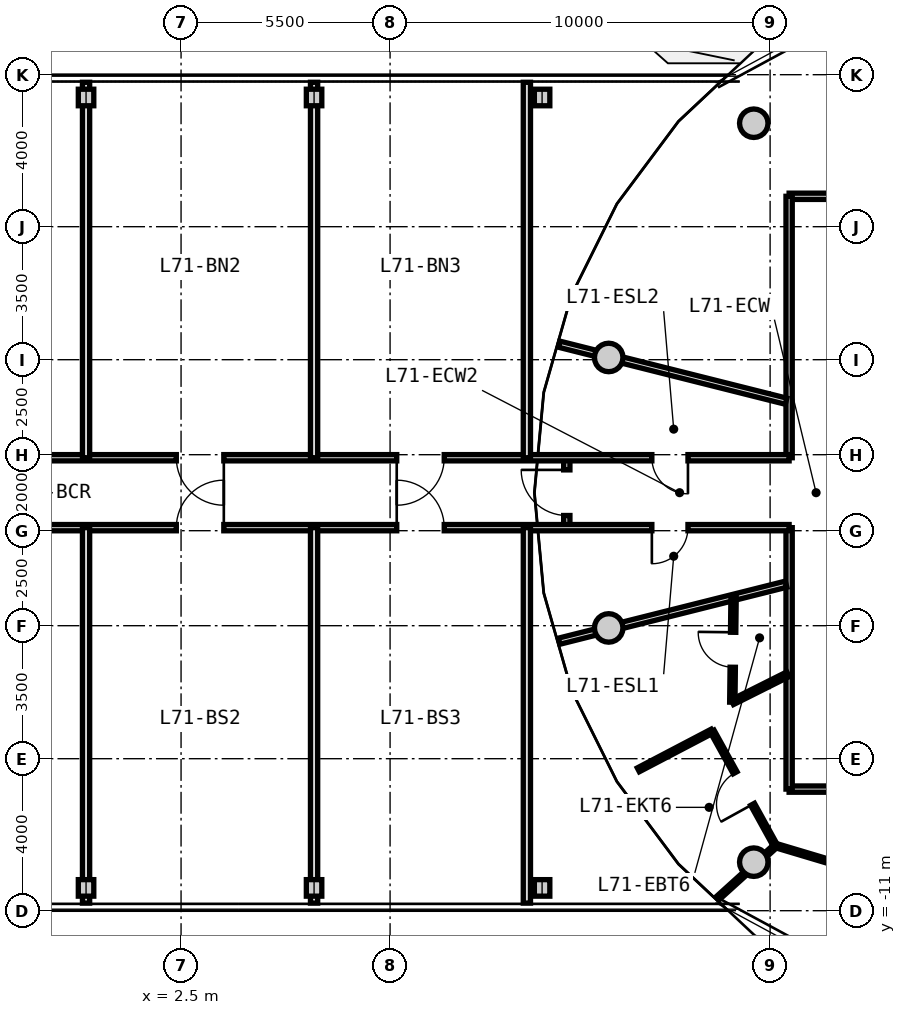
"""IFC4 building model, lengths in metres.
Left out: names, types, materials, properties, quantities, classifications, styles, units other than length and angle.
Written with IfcOpenShell. Run it as: python <this file> out.ifc"""

import sys

from ifc_helpers import new_model, si_unit, direction, frame, frame_2d, origin, origin_2d, place, context, subcontext, project, spatial, rectangle, circle, i_section, extrude, source, transform, mapped, element, fill, save


model = new_model("IFC4")
c1 = context("Model", 3, precision=1e-05, world=origin(), true_north=direction((0.0, 1.0)))
c2 = subcontext(c1, "Body", "Model", "MODEL_VIEW")
j1 = project(units=[si_unit("LENGTHUNIT", "METRE"), si_unit("PLANEANGLEUNIT", "RADIAN")], contexts=[c1])
p1 = place(None, origin())
s1 = spatial("IfcSite", under=j1, at=p1, CompositionType="ELEMENT")
p2 = place(p1, origin())
s2 = spatial("IfcBuilding", under=s1, at=p2, CompositionType="ELEMENT")
p3 = place(p2, frame((0.0, 0.0, 229.15)))
s3 = spatial("IfcBuildingStorey", under=s2, at=p3, CompositionType="ELEMENT", Elevation=229.15)
m1 = source(origin(), c2, "Body", "SweptSolid", [
    extrude(circle(Radius=0.375, at=origin_2d()), origin(), (0.0, 0.0, 1.0), 3.05),
])
for number, where, z_axis, x_axis in (
    (1, (17.57, 9.723, 0.0), (0.0, 0.0, 1.0), (1.0, 0.0, 0.0)),
    (2, (13.753, 3.559, 0.0), (0.0, 0.0, 1.0), (1.0, 0.0, 0.0)),
    (3, (13.753, -3.559, 0.0), (0.0, 0.0, 1.0), (1.0, 0.0, 0.0)),
    (4, (17.57, -9.723, 0.0), (0.0, 0.0, 1.0), (1.0, 0.0, 0.0)),
):
    element("IfcColumn", number, at=place(p3, frame(where, z_axis=z_axis, x_axis=x_axis)), inside=s3, PredefinedType="COLUMN", context=c2, shape_type="MappedRepresentation", body=[
        mapped(m1, transform((0.0, 0.0, 0.0), x_axis=(1.0, 0.0, 0.0), y_axis=(0.0, 1.0, 0.0), z_axis=(0.0, 0.0, 1.0), scale=1.0)),
    ])
m2 = source(origin(), c2, "Body", "SweptSolid", [
    extrude(i_section(OverallWidth=0.407, OverallDepth=0.435, WebThickness=0.024, FlangeThickness=0.039, FilletRadius=0.015, at=origin_2d()), origin(), (0.0, 0.0, 1.0), 3.05),
])
for number, where, z_axis, x_axis in (
    (5, (0.0, -10.4, 0.0), (0.0, 0.0, 1.0), (1.0, 0.0, 0.0)),
    (6, (0.0, 10.4, 0.0), (0.0, 0.0, 1.0), (1.0, 0.0, 0.0)),
    (7, (6.0, -10.4, 0.0), (0.0, 0.0, 1.0), (1.0, 0.0, 0.0)),
    (8, (6.0, 10.4, 0.0), (0.0, 0.0, 1.0), (1.0, 0.0, 0.0)),
    (9, (12.0, -10.4, 0.0), (0.0, 0.0, 1.0), (1.0, 0.0, 0.0)),
    (10, (12.0, 10.4, 0.0), (0.0, 0.0, 1.0), (1.0, 0.0, 0.0)),
):
    element("IfcColumn", number, at=place(p3, frame(where, z_axis=z_axis, x_axis=x_axis)), inside=s3, PredefinedType="COLUMN", context=c2, shape_type="MappedRepresentation", body=[
        mapped(m2, transform((0.0, 0.0, 0.0), x_axis=(1.0, 0.0, 0.0), y_axis=(0.0, 1.0, 0.0), z_axis=(0.0, 0.0, 1.0), scale=1.0)),
    ])
m3 = source(origin(), c2, "Body", "SweptSolid", [
    extrude(rectangle(XDim=8.58, YDim=0.165, at=frame_2d((4.29, 0.0))), origin(), (0.0, 0.0, 1.0), 2.795),
])
p4 = place(p3, frame((18.5, 7.8, 0.0), z_axis=(0.0, 0.0, 1.0), x_axis=(1.0, 0.0, 0.0)))
e11 = element("IfcWall", 11, at=p4, inside=s3, PredefinedType="PARTITIONING", context=c2, shape_type="MappedRepresentation", body=[
    mapped(m3, transform((0.0, 0.0, 0.0), x_axis=(1.0, 0.0, 0.0), y_axis=(0.0, 1.0, 0.0), z_axis=(0.0, 0.0, 1.0), scale=1.0)),
])
p5 = place(p4, frame((3.11, 0.0, 0.0)))
e12 = element("IfcOpeningElement", 12, at=p5, cuts=e11, PredefinedType="OPENING", context=c2, shape_type="SweptSolid", body=[
    extrude(rectangle(XDim=1.25, YDim=2.2, at=frame_2d((0.625, 1.1))), frame((0.0, 0.093, 0.0), z_axis=(0.0, -1.0, 0.0), x_axis=(1.0, 0.0, 0.0)), (0.0, 0.0, 1.0), 0.185),
])
m4 = source(origin(), c2, "Body", "SweptSolid", [
    extrude(rectangle(XDim=19.0, YDim=0.165, at=frame_2d((9.5, 0.0))), origin(), (0.0, 0.0, 1.0), 2.795),
])
p6 = place(p3, frame((37.5, -7.8, 0.0), z_axis=(0.0, 0.0, 1.0), x_axis=(-1.0, 0.0, 0.0)))
e13 = element("IfcWall", 13, at=p6, inside=s3, PredefinedType="PARTITIONING", context=c2, shape_type="MappedRepresentation", body=[
    mapped(m4, transform((0.0, 0.0, 0.0), x_axis=(1.0, 0.0, 0.0), y_axis=(0.0, 1.0, 0.0), z_axis=(0.0, 0.0, 1.0), scale=1.0)),
])
p7 = place(p6, frame((9.392, 0.0, 0.0)))
e14 = element("IfcOpeningElement", 14, at=p7, cuts=e13, PredefinedType="OPENING", context=c2, shape_type="SweptSolid", body=[
    extrude(rectangle(XDim=1.05, YDim=2.15, at=frame_2d((0.525, 1.075))), frame((0.0, 0.093, 0.0), z_axis=(0.0, -1.0, 0.0), x_axis=(1.0, 0.0, 0.0)), (0.0, 0.0, 1.0), 0.185),
])
m5 = source(origin(), c2, "Body", "SweptSolid", [
    extrude(rectangle(XDim=6.88, YDim=0.165, at=frame_2d((3.44, 0.0))), origin(), (0.0, 0.0, 1.0), 2.795),
])
for number, where, z_axis, x_axis in (
    (15, (18.5, -7.8, 0.0), (0.0, 0.0, 1.0), (0.0, 1.0, 0.0)),
    (16, (18.5, 0.92, 0.0), (0.0, 0.0, 1.0), (0.0, 1.0, 0.0)),
):
    element("IfcWall", number, at=place(p3, frame(where, z_axis=z_axis, x_axis=x_axis)), inside=s3, PredefinedType="PARTITIONING", context=c2, shape_type="MappedRepresentation", body=[
        mapped(m5, transform((0.0, 0.0, 0.0), x_axis=(1.0, 0.0, 0.0), y_axis=(0.0, 1.0, 0.0), z_axis=(0.0, 0.0, 1.0), scale=1.0)),
    ])
m6 = source(origin(), c2, "Body", "SweptSolid", [
    extrude(rectangle(XDim=6.157, YDim=0.165, at=frame_2d((3.079, 0.0))), origin(), (0.0, 0.0, 1.0), 2.395),
])
for number, where, z_axis, x_axis in (
    (17, (18.42, 2.407, 0.0), (0.0, 0.0, 1.0), (-0.97, 0.244, 0.0)),
    (18, (18.42, -2.407, 0.0), (0.0, 0.0, 1.0), (-0.97, -0.244, 0.0)),
):
    element("IfcWall", number, at=place(p3, frame(where, z_axis=z_axis, x_axis=x_axis)), inside=s3, PredefinedType="PARTITIONING", context=c2, shape_type="MappedRepresentation", body=[
        mapped(m6, transform((0.0, 0.0, 0.0), x_axis=(1.0, 0.0, 0.0), y_axis=(0.0, 1.0, 0.0), z_axis=(0.0, 0.0, 1.0), scale=1.0)),
    ])
m7 = source(origin(), c2, "Body", "SweptSolid", [
    extrude(rectangle(XDim=6.936, YDim=0.115, at=frame_2d((3.468, 0.0))), origin(), (0.0, 0.0, 1.0), 2.795),
])
p8 = place(p3, frame((18.151, -9.287, 0.0), z_axis=(0.0, 0.0, 1.0), x_axis=(0.958186895835, -0.286143098205, 0.0)))
e19 = element("IfcWall", 19, at=p8, inside=s3, PredefinedType="PARTITIONING", context=c2, shape_type="MappedRepresentation", body=[
    mapped(m7, transform((0.0, 0.0, 0.0), x_axis=(1.0, 0.0, 0.0), y_axis=(0.0, 1.0, 0.0), z_axis=(0.0, 0.0, 1.0), scale=1.0)),
])
p9 = place(p8, frame((2.993, 0.0, 0.0)))
e20 = element("IfcOpeningElement", 20, at=p9, cuts=e19, PredefinedType="OPENING", context=c2, shape_type="SweptSolid", body=[
    extrude(rectangle(XDim=0.95, YDim=2.1, at=frame_2d((0.475, 1.05))), frame((0.0, 0.067, 0.0), z_axis=(0.0, -1.0, 0.0), x_axis=(1.0, 0.0, 0.0)), (0.0, 0.0, 1.0), 0.135),
])
m8 = source(origin(), c2, "Body", "SweptSolid", [
    extrude(rectangle(XDim=2.072, YDim=0.115, at=frame_2d((1.036, 0.0))), origin(), (0.0, 0.0, 1.0), 2.395),
])
p10 = place(p3, frame((18.151, -9.287, 0.0), z_axis=(0.0, 0.0, 1.0), x_axis=(-0.741410125356, -0.671052178314, 0.0)))
e21 = element("IfcWall", 21, at=p10, inside=s3, PredefinedType="PARTITIONING", context=c2, shape_type="MappedRepresentation", body=[
    mapped(m8, transform((0.0, 0.0, 0.0), x_axis=(1.0, 0.0, 0.0), y_axis=(0.0, 1.0, 0.0), z_axis=(0.0, 0.0, 1.0), scale=1.0)),
])
m9 = source(origin(), c2, "Body", "SweptSolid", [
    extrude(rectangle(XDim=1.638, YDim=0.14, at=frame_2d((0.819, 0.0))), origin(), (0.0, 0.0, 1.0), 2.795),
])
p11 = place(p3, frame((18.47, -4.778, 0.0), z_axis=(0.0, 0.0, 1.0), x_axis=(-0.893919977945, -0.448226586707, 0.0)))
e22 = element("IfcWall", 22, at=p11, inside=s3, PredefinedType="PARTITIONING", context=c2, shape_type="MappedRepresentation", body=[
    mapped(m9, transform((0.0, 0.0, 0.0), x_axis=(1.0, 0.0, 0.0), y_axis=(0.0, 1.0, 0.0), z_axis=(0.0, 0.0, 1.0), scale=1.0)),
])
m10 = source(origin(), c2, "Body", "SweptSolid", [
    extrude(rectangle(XDim=2.759, YDim=0.14, at=frame_2d((1.379, 0.0))), origin(), (0.0, 0.0, 1.0), 2.795),
])
p12 = place(p3, frame((17.005, -5.513, 0.0), z_axis=(0.0, 0.0, 1.0), x_axis=(0.01194710728, 0.999928630767, 0.0)))
e23 = element("IfcWall", 23, at=p12, inside=s3, PredefinedType="PARTITIONING", context=c2, shape_type="MappedRepresentation", body=[
    mapped(m10, transform((0.0, 0.0, 0.0), x_axis=(1.0, 0.0, 0.0), y_axis=(0.0, 1.0, 0.0), z_axis=(0.0, 0.0, 1.0), scale=1.0)),
])
p13 = place(p12, frame((0.919, 0.0, 0.0)))
e24 = element("IfcOpeningElement", 24, at=p13, cuts=e23, PredefinedType="OPENING", context=c2, shape_type="SweptSolid", body=[
    extrude(rectangle(XDim=0.92, YDim=2.1, at=frame_2d((0.46, 1.05))), frame((0.0, 0.08, 0.0), z_axis=(0.0, -1.0, 0.0), x_axis=(1.0, 0.0, 0.0)), (0.0, 0.0, 1.0), 0.16),
])
m11 = source(origin(), c2, "Body", "SweptSolid", [
    extrude(rectangle(XDim=2.193, YDim=0.115, at=frame_2d((1.097, 0.0))), origin(), (0.0, 0.0, 1.0), 2.795),
])
p14 = place(p3, frame((16.475, -6.275, 0.0), z_axis=(0.0, 0.0, 1.0), x_axis=(-0.885783595046, -0.464098505435, 0.0)))
e25 = element("IfcWall", 25, at=p14, inside=s3, PredefinedType="PARTITIONING", context=c2, shape_type="MappedRepresentation", body=[
    mapped(m11, transform((0.0, 0.0, 0.0), x_axis=(1.0, 0.0, 0.0), y_axis=(0.0, 1.0, 0.0), z_axis=(0.0, 0.0, 1.0), scale=1.0)),
])
m12 = source(origin(), c2, "Body", "SweptSolid", [
    extrude(rectangle(XDim=3.45, YDim=0.115, at=frame_2d((1.725, 0.0))), origin(), (0.0, 0.0, 1.0), 2.795),
])
p15 = place(p3, frame((16.475, -6.275, 0.0), z_axis=(0.0, 0.0, 1.0), x_axis=(0.483659007882, -0.875256513312, 0.0)))
e26 = element("IfcWall", 26, at=p15, inside=s3, PredefinedType="PARTITIONING", context=c2, shape_type="MappedRepresentation", body=[
    mapped(m12, transform((0.0, 0.0, 0.0), x_axis=(1.0, 0.0, 0.0), y_axis=(0.0, 1.0, 0.0), z_axis=(0.0, 0.0, 1.0), scale=1.0)),
])
p16 = place(p15, frame((1.25, 0.0, 0.0)))
e27 = element("IfcOpeningElement", 27, at=p16, cuts=e26, PredefinedType="OPENING", context=c2, shape_type="SweptSolid", body=[
    extrude(rectangle(XDim=0.95, YDim=2.1, at=frame_2d((0.475, 1.05))), frame((0.0, 0.067, 0.0), z_axis=(0.0, -1.0, 0.0), x_axis=(1.0, 0.0, 0.0)), (0.0, 0.0, 1.0), 0.135),
])
m13 = source(origin(), c2, "Body", "SweptSolid", [
    extrude(rectangle(XDim=1.84, YDim=0.165, at=frame_2d((0.92, 0.0))), origin(), (0.0, 0.0, 1.0), 2.795),
])
p17 = place(p3, frame((12.65, -0.92, 0.0), z_axis=(0.0, 0.0, 1.0), x_axis=(0.0, 1.0, 0.0)))
e28 = element("IfcWall", 28, at=p17, inside=s3, PredefinedType="PARTITIONING", context=c2, shape_type="MappedRepresentation", body=[
    mapped(m13, transform((0.0, 0.0, 0.0), x_axis=(1.0, 0.0, 0.0), y_axis=(0.0, 1.0, 0.0), z_axis=(0.0, 0.0, 1.0), scale=1.0)),
])
p18 = place(p17, frame((0.32, 0.0, 0.0)))
e29 = element("IfcOpeningElement", 29, at=p18, cuts=e28, PredefinedType="OPENING", context=c2, shape_type="SweptSolid", body=[
    extrude(rectangle(XDim=1.2, YDim=2.15, at=frame_2d((0.6, 1.075))), frame((0.0, 0.093, 0.0), z_axis=(0.0, -1.0, 0.0), x_axis=(1.0, 0.0, 0.0)), (0.0, 0.0, 1.0), 0.185),
])
m14 = source(origin(), c2, "Body", "SweptSolid", [
    extrude(rectangle(XDim=37.0, YDim=0.165, at=frame_2d((18.5, 0.0))), origin(), (0.0, 0.0, 1.0), 2.795),
])
p19 = place(p3, frame((-18.5, -0.92, 0.0), z_axis=(0.0, 0.0, 1.0), x_axis=(1.0, 0.0, 0.0)))
e30 = element("IfcWall", 30, at=p19, inside=s3, PredefinedType="PARTITIONING", context=c2, shape_type="MappedRepresentation", body=[
    mapped(m14, transform((0.0, 0.0, 0.0), x_axis=(1.0, 0.0, 0.0), y_axis=(0.0, 1.0, 0.0), z_axis=(0.0, 0.0, 1.0), scale=1.0)),
])
p20 = place(p19, frame((2.662, 0.0, 0.0)))
e31 = element("IfcOpeningElement", 31, at=p20, cuts=e30, PredefinedType="OPENING", context=c2, shape_type="SweptSolid", body=[
    extrude(rectangle(XDim=0.95, YDim=2.1, at=frame_2d((0.475, 1.05))), frame((0.0, 0.093, 0.0), z_axis=(0.0, -1.0, 0.0), x_axis=(1.0, 0.0, 0.0)), (0.0, 0.0, 1.0), 0.185),
])
p21 = place(p19, frame((33.388, 0.0, 0.0)))
e32 = element("IfcOpeningElement", 32, at=p21, cuts=e30, PredefinedType="OPENING", context=c2, shape_type="SweptSolid", body=[
    extrude(rectangle(XDim=0.95, YDim=2.1, at=frame_2d((0.475, 1.05))), frame((0.0, 0.093, 0.0), z_axis=(0.0, -1.0, 0.0), x_axis=(1.0, 0.0, 0.0)), (0.0, 0.0, 1.0), 0.185),
])
p22 = place(p19, frame((12.71, 0.0, 0.0)))
e33 = element("IfcOpeningElement", 33, at=p22, cuts=e30, PredefinedType="OPENING", context=c2, shape_type="SweptSolid", body=[
    extrude(rectangle(XDim=1.25, YDim=2.2, at=frame_2d((0.625, 1.1))), frame((0.0, 0.093, 0.0), z_axis=(0.0, -1.0, 0.0), x_axis=(1.0, 0.0, 0.0)), (0.0, 0.0, 1.0), 0.185),
])
p23 = place(p19, frame((20.875, 0.0, 0.0)))
e34 = element("IfcOpeningElement", 34, at=p23, cuts=e30, PredefinedType="OPENING", context=c2, shape_type="SweptSolid", body=[
    extrude(rectangle(XDim=1.25, YDim=2.2, at=frame_2d((0.625, 1.1))), frame((0.0, 0.093, 0.0), z_axis=(0.0, -1.0, 0.0), x_axis=(1.0, 0.0, 0.0)), (0.0, 0.0, 1.0), 0.185),
])
p24 = place(p19, frame((26.675, 0.0, 0.0)))
e35 = element("IfcOpeningElement", 35, at=p24, cuts=e30, PredefinedType="OPENING", context=c2, shape_type="SweptSolid", body=[
    extrude(rectangle(XDim=1.25, YDim=2.2, at=frame_2d((0.625, 1.1))), frame((0.0, 0.093, 0.0), z_axis=(0.0, -1.0, 0.0), x_axis=(1.0, 0.0, 0.0)), (0.0, 0.0, 1.0), 0.185),
])
p25 = place(p3, frame((-18.5, 0.92, 0.0), z_axis=(0.0, 0.0, 1.0), x_axis=(1.0, 0.0, 0.0)))
e36 = element("IfcWall", 36, at=p25, inside=s3, PredefinedType="PARTITIONING", context=c2, shape_type="MappedRepresentation", body=[
    mapped(m14, transform((0.0, 0.0, 0.0), x_axis=(1.0, 0.0, 0.0), y_axis=(0.0, 1.0, 0.0), z_axis=(0.0, 0.0, 1.0), scale=1.0)),
])
p26 = place(p25, frame((2.662, 0.0, 0.0)))
e37 = element("IfcOpeningElement", 37, at=p26, cuts=e36, PredefinedType="OPENING", context=c2, shape_type="SweptSolid", body=[
    extrude(rectangle(XDim=0.95, YDim=2.1, at=frame_2d((0.475, 1.05))), frame((0.0, 0.093, 0.0), z_axis=(0.0, -1.0, 0.0), x_axis=(1.0, 0.0, 0.0)), (0.0, 0.0, 1.0), 0.185),
])
p27 = place(p25, frame((33.388, 0.0, 0.0)))
e38 = element("IfcOpeningElement", 38, at=p27, cuts=e36, PredefinedType="OPENING", context=c2, shape_type="SweptSolid", body=[
    extrude(rectangle(XDim=0.95, YDim=2.1, at=frame_2d((0.475, 1.05))), frame((0.0, 0.093, 0.0), z_axis=(0.0, -1.0, 0.0), x_axis=(1.0, 0.0, 0.0)), (0.0, 0.0, 1.0), 0.185),
])
p28 = place(p25, frame((7.64, 0.0, 0.0)))
e39 = element("IfcOpeningElement", 39, at=p28, cuts=e36, PredefinedType="OPENING", context=c2, shape_type="SweptSolid", body=[
    extrude(rectangle(XDim=0.92, YDim=2.1, at=frame_2d((0.46, 1.05))), frame((0.0, 0.093, 0.0), z_axis=(0.0, -1.0, 0.0), x_axis=(1.0, 0.0, 0.0)), (0.0, 0.0, 1.0), 0.185),
])
p29 = place(p25, frame((13.275, 0.0, 0.0)))
e40 = element("IfcOpeningElement", 40, at=p29, cuts=e36, PredefinedType="OPENING", context=c2, shape_type="SweptSolid", body=[
    extrude(rectangle(XDim=1.25, YDim=2.2, at=frame_2d((0.625, 1.1))), frame((0.0, 0.093, 0.0), z_axis=(0.0, -1.0, 0.0), x_axis=(1.0, 0.0, 0.0)), (0.0, 0.0, 1.0), 0.185),
])
p30 = place(p25, frame((20.875, 0.0, 0.0)))
e41 = element("IfcOpeningElement", 41, at=p30, cuts=e36, PredefinedType="OPENING", context=c2, shape_type="SweptSolid", body=[
    extrude(rectangle(XDim=1.25, YDim=2.2, at=frame_2d((0.625, 1.1))), frame((0.0, 0.093, 0.0), z_axis=(0.0, -1.0, 0.0), x_axis=(1.0, 0.0, 0.0)), (0.0, 0.0, 1.0), 0.185),
])
p31 = place(p25, frame((26.675, 0.0, 0.0)))
e42 = element("IfcOpeningElement", 42, at=p31, cuts=e36, PredefinedType="OPENING", context=c2, shape_type="SweptSolid", body=[
    extrude(rectangle(XDim=1.25, YDim=2.2, at=frame_2d((0.625, 1.1))), frame((0.0, 0.093, 0.0), z_axis=(0.0, -1.0, 0.0), x_axis=(1.0, 0.0, 0.0)), (0.0, 0.0, 1.0), 0.185),
])
m15 = source(origin(), c2, "Body", "SweptSolid", [
    extrude(rectangle(XDim=9.88, YDim=0.19, at=frame_2d((4.94, 0.0))), origin(), (0.0, 0.0, 1.0), 2.795),
])
for number, where, z_axis, x_axis in (
    (43, (11.6, -10.8, 0.0), (0.0, 0.0, 1.0), (0.0, 1.0, 0.0)),
    (44, (11.6, 0.92, 0.0), (0.0, 0.0, 1.0), (0.0, 1.0, 0.0)),
):
    element("IfcWall", number, at=place(p3, frame(where, z_axis=z_axis, x_axis=x_axis)), inside=s3, PredefinedType="PARTITIONING", context=c2, shape_type="MappedRepresentation", body=[
        mapped(m15, transform((0.0, 0.0, 0.0), x_axis=(1.0, 0.0, 0.0), y_axis=(0.0, 1.0, 0.0), z_axis=(0.0, 0.0, 1.0), scale=1.0)),
    ])
m16 = source(origin(), c2, "Body", "SweptSolid", [
    extrude(rectangle(XDim=9.88, YDim=0.19, at=frame_2d((4.94, 0.0))), origin(), (0.0, 0.0, 1.0), 2.095),
])
for number, where, z_axis, x_axis in (
    (45, (0.0, -10.8, 0.0), (0.0, 0.0, 1.0), (0.0, 1.0, 0.0)),
    (46, (0.0, 0.92, 0.0), (0.0, 0.0, 1.0), (0.0, 1.0, 0.0)),
    (47, (6.0, -10.8, 0.0), (0.0, 0.0, 1.0), (0.0, 1.0, 0.0)),
    (48, (6.0, 0.92, 0.0), (0.0, 0.0, 1.0), (0.0, 1.0, 0.0)),
):
    element("IfcWall", number, at=place(p3, frame(where, z_axis=z_axis, x_axis=x_axis)), inside=s3, PredefinedType="PARTITIONING", context=c2, shape_type="MappedRepresentation", body=[
        mapped(m16, transform((0.0, 0.0, 0.0), x_axis=(1.0, 0.0, 0.0), y_axis=(0.0, 1.0, 0.0), z_axis=(0.0, 0.0, 1.0), scale=1.0)),
    ])
m17 = source(origin(), c2, "Body", "SweptSolid", [
    extrude(rectangle(XDim=0.95, YDim=2.1, at=frame_2d((0.475, 1.05))), frame((0.0, 0.025, 0.0), z_axis=(0.0, -1.0, 0.0), x_axis=(1.0, 0.0, 0.0)), (0.0, 0.0, 1.0), 0.05),
])
p32 = place(p21, frame((0.95, 0.0, 0.0), z_axis=(0.0, 0.0, 1.0), x_axis=(-1.0, 0.0, 0.0)))
e49 = element("IfcDoor", 49, at=p32, inside=s3, OperationType="SINGLE_SWING_RIGHT", PredefinedType="DOOR", context=c2, shape_type="MappedRepresentation", body=[
    mapped(m17, transform((0.0, 0.0, 0.0), x_axis=(1.0, 0.0, 0.0), y_axis=(0.0, 1.0, 0.0), z_axis=(0.0, 0.0, 1.0), scale=1.0)),
])
fill(e32, e49)
p33 = place(p27, frame((0.95, 0.0, 0.0), z_axis=(0.0, 0.0, 1.0), x_axis=(-1.0, 0.0, 0.0)))
e50 = element("IfcDoor", 50, at=p33, inside=s3, OperationType="SINGLE_SWING_LEFT", PredefinedType="DOOR", context=c2, shape_type="MappedRepresentation", body=[
    mapped(m17, transform((0.0, 0.0, 0.0), x_axis=(1.0, 0.0, 0.0), y_axis=(0.0, 1.0, 0.0), z_axis=(0.0, 0.0, 1.0), scale=1.0)),
])
fill(e38, e50)
m18 = source(origin(), c2, "Body", "SweptSolid", [
    extrude(rectangle(XDim=0.92, YDim=2.1, at=frame_2d((0.46, 1.05))), frame((0.0, 0.025, 0.0), z_axis=(0.0, -1.0, 0.0), x_axis=(1.0, 0.0, 0.0)), (0.0, 0.0, 1.0), 0.05),
])
p34 = place(p13, origin())
e51 = element("IfcDoor", 51, at=p34, inside=s3, OperationType="SINGLE_SWING_RIGHT", PredefinedType="DOOR", context=c2, shape_type="MappedRepresentation", body=[
    mapped(m18, transform((0.0, 0.0, 0.0), x_axis=(1.0, 0.0, 0.0), y_axis=(0.0, 1.0, 0.0), z_axis=(0.0, 0.0, 1.0), scale=1.0)),
])
fill(e24, e51)
p35 = place(p16, frame((0.95, 0.0, 0.0), z_axis=(0.0, 0.0, 1.0), x_axis=(-1.0, 0.0, 0.0)))
e52 = element("IfcDoor", 52, at=p35, inside=s3, OperationType="SINGLE_SWING_LEFT", PredefinedType="DOOR", context=c2, shape_type="MappedRepresentation", body=[
    mapped(m17, transform((0.0, 0.0, 0.0), x_axis=(1.0, 0.0, 0.0), y_axis=(0.0, 1.0, 0.0), z_axis=(0.0, 0.0, 1.0), scale=1.0)),
])
fill(e27, e52)
m19 = source(origin(), c2, "Body", "SweptSolid", [
    extrude(rectangle(XDim=1.2, YDim=2.15, at=frame_2d((0.6, 1.075))), frame((0.0, 0.025, 0.0), z_axis=(0.0, -1.0, 0.0), x_axis=(1.0, 0.0, 0.0)), (0.0, 0.0, 1.0), 0.05),
])
p36 = place(p18, origin())
e53 = element("IfcDoor", 53, at=p36, inside=s3, OperationType="SINGLE_SWING_RIGHT", PredefinedType="DOOR", context=c2, shape_type="MappedRepresentation", body=[
    mapped(m19, transform((0.0, 0.0, 0.0), x_axis=(1.0, 0.0, 0.0), y_axis=(0.0, 1.0, 0.0), z_axis=(0.0, 0.0, 1.0), scale=1.0)),
])
fill(e29, e53)
m20 = source(origin(), c2, "Body", "SweptSolid", [
    extrude(rectangle(XDim=1.25, YDim=2.2, at=frame_2d((0.625, 1.1))), frame((0.0, 0.025, 0.0), z_axis=(0.0, -1.0, 0.0), x_axis=(1.0, 0.0, 0.0)), (0.0, 0.0, 1.0), 0.05),
])
p37 = place(p23, origin())
e54 = element("IfcDoor", 54, at=p37, inside=s3, OperationType="SINGLE_SWING_RIGHT", PredefinedType="DOOR", context=c2, shape_type="MappedRepresentation", body=[
    mapped(m20, transform((0.0, 0.0, 0.0), x_axis=(1.0, 0.0, 0.0), y_axis=(0.0, 1.0, 0.0), z_axis=(0.0, 0.0, 1.0), scale=1.0)),
])
fill(e34, e54)
p38 = place(p30, frame((1.25, 0.0, 0.0), z_axis=(0.0, 0.0, 1.0), x_axis=(-1.0, 0.0, 0.0)))
e55 = element("IfcDoor", 55, at=p38, inside=s3, OperationType="SINGLE_SWING_LEFT", PredefinedType="DOOR", context=c2, shape_type="MappedRepresentation", body=[
    mapped(m20, transform((0.0, 0.0, 0.0), x_axis=(1.0, 0.0, 0.0), y_axis=(0.0, 1.0, 0.0), z_axis=(0.0, 0.0, 1.0), scale=1.0)),
])
fill(e41, e55)
p39 = place(p24, origin())
e56 = element("IfcDoor", 56, at=p39, inside=s3, OperationType="SINGLE_SWING_LEFT", PredefinedType="DOOR", context=c2, shape_type="MappedRepresentation", body=[
    mapped(m20, transform((0.0, 0.0, 0.0), x_axis=(1.0, 0.0, 0.0), y_axis=(0.0, 1.0, 0.0), z_axis=(0.0, 0.0, 1.0), scale=1.0)),
])
fill(e35, e56)
p40 = place(p31, frame((1.25, 0.0, 0.0), z_axis=(0.0, 0.0, 1.0), x_axis=(-1.0, 0.0, 0.0)))
e57 = element("IfcDoor", 57, at=p40, inside=s3, OperationType="SINGLE_SWING_RIGHT", PredefinedType="DOOR", context=c2, shape_type="MappedRepresentation", body=[
    mapped(m20, transform((0.0, 0.0, 0.0), x_axis=(1.0, 0.0, 0.0), y_axis=(0.0, 1.0, 0.0), z_axis=(0.0, 0.0, 1.0), scale=1.0)),
])
fill(e42, e57)
save(model, sys.argv[1])
